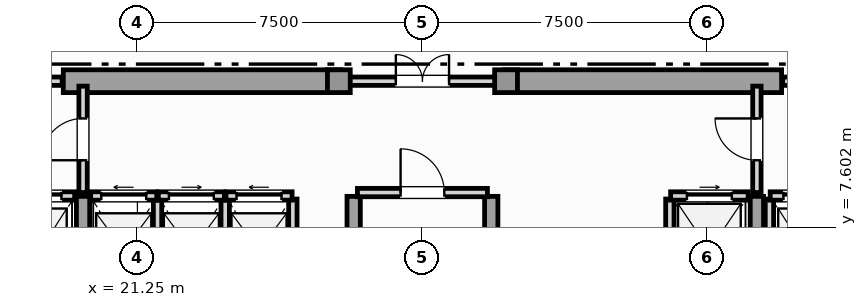
"""IFC4 building model, lengths in metres.
Left out: names, types, materials, properties, quantities, classifications, styles, units other than length and angle.
Written with IfcOpenShell. Run it as: python <this file> out.ifc"""

import sys

from ifc_helpers import new_model, si_unit, direction, frame, frame_2d, origin, origin_2d, place, context, subcontext, project, spatial, rectangle, extrude, element, fill, save


model = new_model("IFC4")
c1 = context("Model", 3, precision=1e-05, world=origin(), true_north=direction((0.0, 1.0)))
c2 = subcontext(c1, "Body", "Model", "MODEL_VIEW")
j1 = project(units=[si_unit("LENGTHUNIT", "METRE"), si_unit("PLANEANGLEUNIT", "RADIAN")], contexts=[c1])
p1 = place(None, origin())
s1 = spatial("IfcSite", under=j1, at=p1, CompositionType="ELEMENT")
p2 = place(p1, origin())
s2 = spatial("IfcBuilding", under=s1, at=p2, CompositionType="ELEMENT")
p3 = place(p2, frame((0.0, 0.0, 292.6)))
s3 = spatial("IfcBuildingStorey", under=s2, at=p3, CompositionType="ELEMENT", Elevation=292.6)
for number, where, z_axis, x_axis in (
    (1, (19.3, 11.45, 0.0), (0.0, 0.0, 1.0), (1.0, 0.0, 0.0)),
    (2, (30.9, 11.45, 0.0), (0.0, 0.0, 1.0), (1.0, 0.0, 0.0)),
):
    element("IfcWall", number, at=place(p3, frame(where, z_axis=z_axis, x_axis=x_axis)), inside=s3, PredefinedType="SHEAR", context=c2, shape_type="SweptSolid", body=[
        extrude(rectangle(XDim=7.3, YDim=0.6, at=frame_2d((3.65, 0.0))), origin(), (0.0, 0.0, 1.0), 3.65),
    ])
for number, where, z_axis, x_axis in (
    (3, (19.82, 0.92, 0.0), (0.0, 0.0, 1.0), (0.0, 1.0, 0.0)),
    (4, (26.94, 0.92, 0.0), (0.0, 0.0, 1.0), (0.0, 1.0, 0.0)),
    (5, (30.56, 0.92, 0.0), (0.0, 0.0, 1.0), (0.0, 1.0, 0.0)),
    (6, (37.55, 0.92, 0.0), (0.0, 0.0, 1.0), (0.0, 1.0, 0.0)),
):
    element("IfcWall", number, at=place(p3, frame(where, z_axis=z_axis, x_axis=x_axis)), inside=s3, PredefinedType="SHEAR", context=c2, shape_type="SweptSolid", body=[
        extrude(rectangle(XDim=7.5, YDim=0.35, at=frame_2d((3.75, 0.0))), origin(), (0.0, 0.0, 1.0), 3.65),
    ])
for number, where, z_axis, x_axis in (
    (7, (26.55, 11.45, 0.0), (0.0, 0.0, 1.0), (1.0, 0.0, 0.0)),
    (8, (30.95, 11.45, 0.0), (0.0, 0.0, 1.0), (1.0, 0.0, 0.0)),
):
    element("IfcColumn", number, at=place(p3, frame(where, z_axis=z_axis, x_axis=x_axis)), inside=s3, PredefinedType="COLUMN", context=c2, shape_type="SweptSolid", body=[
        extrude(rectangle(XDim=0.6, YDim=0.6, at=origin_2d()), origin(), (0.0, 0.0, 1.0), 3.85),
    ])
p4 = place(p3, frame((17.78, 8.43, 0.0), z_axis=(0.0, 0.0, 1.0), x_axis=(1.0, 0.0, 0.0)))
e9 = element("IfcWall", 9, at=p4, inside=s3, PredefinedType="SOLIDWALL", context=c2, shape_type="SweptSolid", body=[
    extrude(rectangle(XDim=1.82, YDim=0.22, at=frame_2d((0.91, 0.0))), origin(), (0.0, 0.0, 1.0), 3.65),
])
p5 = place(p4, frame((0.35, 0.0, 0.0)))
e10 = element("IfcOpeningElement", 10, at=p5, cuts=e9, PredefinedType="OPENING", context=c2, shape_type="SweptSolid", body=[
    extrude(rectangle(XDim=1.12, YDim=2.25, at=frame_2d((0.56, 1.125))), frame((0.0, 0.12, 0.0), z_axis=(0.0, -1.0, 0.0), x_axis=(1.0, 0.0, 0.0)), (0.0, 0.0, 1.0), 0.24),
])
p6 = place(p3, frame((37.88, 5.65, 0.0), z_axis=(0.0, 0.0, 1.0), x_axis=(0.0, 1.0, 0.0)))
e11 = element("IfcWall", 11, at=p6, inside=s3, PredefinedType="SOLIDWALL", context=c2, shape_type="SweptSolid", body=[
    extrude(rectangle(XDim=2.7, YDim=0.22, at=frame_2d((1.35, 0.0))), origin(), (0.0, 0.0, 1.0), 3.65),
])
p7 = place(p3, frame((37.9, 8.43, 0.0), z_axis=(0.0, 0.0, 1.0), x_axis=(1.0, 0.0, 0.0)))
e12 = element("IfcWall", 12, at=p7, inside=s3, PredefinedType="SOLIDWALL", context=c2, shape_type="SweptSolid", body=[
    extrude(rectangle(XDim=1.82, YDim=0.22, at=frame_2d((0.91, 0.0))), origin(), (0.0, 0.0, 1.0), 3.65),
])
p8 = place(p7, frame((0.35, 0.0, 0.0)))
e13 = element("IfcOpeningElement", 13, at=p8, cuts=e12, PredefinedType="OPENING", context=c2, shape_type="SweptSolid", body=[
    extrude(rectangle(XDim=1.12, YDim=2.25, at=frame_2d((0.56, 1.125))), frame((0.0, 0.12, 0.0), z_axis=(0.0, -1.0, 0.0), x_axis=(1.0, 0.0, 0.0)), (0.0, 0.0, 1.0), 0.24),
])
p9 = place(p3, frame((35.26, 5.65, 0.0), z_axis=(0.0, 0.0, 1.0), x_axis=(0.0, 1.0, 0.0)))
e14 = element("IfcWall", 14, at=p9, inside=s3, PredefinedType="SOLIDWALL", context=c2, shape_type="SweptSolid", body=[
    extrude(rectangle(XDim=2.7, YDim=0.22, at=frame_2d((1.35, 0.0))), origin(), (0.0, 0.0, 1.0), 3.65),
])
p10 = place(p3, frame((35.28, 8.43, 0.0), z_axis=(0.0, 0.0, 1.0), x_axis=(1.0, 0.0, 0.0)))
e15 = element("IfcWall", 15, at=p10, inside=s3, PredefinedType="SOLIDWALL", context=c2, shape_type="SweptSolid", body=[
    extrude(rectangle(XDim=2.04, YDim=0.22, at=frame_2d((1.02, 0.0))), origin(), (0.0, 0.0, 1.0), 3.65),
])
p11 = place(p10, frame((0.43, 0.0, 0.0)))
e16 = element("IfcOpeningElement", 16, at=p11, cuts=e15, PredefinedType="OPENING", context=c2, shape_type="SweptSolid", body=[
    extrude(rectangle(XDim=1.18, YDim=2.2, at=frame_2d((0.59, 1.1))), frame((0.0, 0.12, 0.0), z_axis=(0.0, -1.0, 0.0), x_axis=(1.0, 0.0, 0.0)), (0.0, 0.0, 1.0), 0.24),
])
p12 = place(p3, frame((21.78, 5.65, 0.0), z_axis=(0.0, 0.0, 1.0), x_axis=(0.0, 1.0, 0.0)))
e17 = element("IfcWall", 17, at=p12, inside=s3, PredefinedType="SOLIDWALL", context=c2, shape_type="SweptSolid", body=[
    extrude(rectangle(XDim=2.7, YDim=0.22, at=frame_2d((1.35, 0.0))), origin(), (0.0, 0.0, 1.0), 3.65),
])
p13 = place(p3, frame((20.02, 8.43, 0.0), z_axis=(0.0, 0.0, 1.0), x_axis=(1.0, 0.0, 0.0)))
e18 = element("IfcWall", 18, at=p13, inside=s3, PredefinedType="SOLIDWALL", context=c2, shape_type="SweptSolid", body=[
    extrude(rectangle(XDim=1.74, YDim=0.22, at=frame_2d((0.87, 0.0))), origin(), (0.0, 0.0, 1.0), 3.65),
])
p14 = place(p13, frame((0.28, 0.0, 0.0)))
e19 = element("IfcOpeningElement", 19, at=p14, cuts=e18, PredefinedType="OPENING", context=c2, shape_type="SweptSolid", body=[
    extrude(rectangle(XDim=1.18, YDim=2.2, at=frame_2d((0.59, 1.1))), frame((0.0, 0.12, 0.0), z_axis=(0.0, -1.0, 0.0), x_axis=(1.0, 0.0, 0.0)), (0.0, 0.0, 1.0), 0.24),
])
p15 = place(p3, frame((23.56, 5.65, 0.0), z_axis=(0.0, 0.0, 1.0), x_axis=(0.0, 1.0, 0.0)))
e20 = element("IfcWall", 20, at=p15, inside=s3, PredefinedType="SOLIDWALL", context=c2, shape_type="SweptSolid", body=[
    extrude(rectangle(XDim=2.7, YDim=0.22, at=frame_2d((1.35, 0.0))), origin(), (0.0, 0.0, 1.0), 3.65),
])
p16 = place(p3, frame((21.8, 8.43, 0.0), z_axis=(0.0, 0.0, 1.0), x_axis=(1.0, 0.0, 0.0)))
e21 = element("IfcWall", 21, at=p16, inside=s3, PredefinedType="SOLIDWALL", context=c2, shape_type="SweptSolid", body=[
    extrude(rectangle(XDim=1.74, YDim=0.22, at=frame_2d((0.87, 0.0))), origin(), (0.0, 0.0, 1.0), 3.65),
])
p17 = place(p16, frame((0.28, 0.0, 0.0)))
e22 = element("IfcOpeningElement", 22, at=p17, cuts=e21, PredefinedType="OPENING", context=c2, shape_type="SweptSolid", body=[
    extrude(rectangle(XDim=1.18, YDim=2.2, at=frame_2d((0.59, 1.1))), frame((0.0, 0.12, 0.0), z_axis=(0.0, -1.0, 0.0), x_axis=(1.0, 0.0, 0.0)), (0.0, 0.0, 1.0), 0.24),
])
p18 = place(p3, frame((25.34, 5.65, 0.0), z_axis=(0.0, 0.0, 1.0), x_axis=(0.0, 1.0, 0.0)))
e23 = element("IfcWall", 23, at=p18, inside=s3, PredefinedType="SOLIDWALL", context=c2, shape_type="SweptSolid", body=[
    extrude(rectangle(XDim=2.7, YDim=0.22, at=frame_2d((1.35, 0.0))), origin(), (0.0, 0.0, 1.0), 3.65),
])
p19 = place(p3, frame((23.58, 8.43, 0.0), z_axis=(0.0, 0.0, 1.0), x_axis=(1.0, 0.0, 0.0)))
e24 = element("IfcWall", 24, at=p19, inside=s3, PredefinedType="SOLIDWALL", context=c2, shape_type="SweptSolid", body=[
    extrude(rectangle(XDim=1.74, YDim=0.22, at=frame_2d((0.87, 0.0))), origin(), (0.0, 0.0, 1.0), 3.65),
])
p20 = place(p19, frame((0.28, 0.0, 0.0)))
e25 = element("IfcOpeningElement", 25, at=p20, cuts=e24, PredefinedType="OPENING", context=c2, shape_type="SweptSolid", body=[
    extrude(rectangle(XDim=1.18, YDim=2.2, at=frame_2d((0.59, 1.1))), frame((0.0, 0.12, 0.0), z_axis=(0.0, -1.0, 0.0), x_axis=(1.0, 0.0, 0.0)), (0.0, 0.0, 1.0), 0.24),
])
p21 = place(p3, frame((27.04, 8.52, 0.0), z_axis=(0.0, 0.0, 1.0), x_axis=(1.0, 0.0, 0.0)))
e26 = element("IfcWall", 26, at=p21, inside=s3, PredefinedType="SOLIDWALL", context=c2, shape_type="SweptSolid", body=[
    extrude(rectangle(XDim=3.42, YDim=0.22, at=frame_2d((1.71, 0.0))), origin(), (0.0, 0.0, 1.0), 3.65),
])
p22 = place(p21, frame((1.135, 0.0, 0.0)))
e27 = element("IfcOpeningElement", 27, at=p22, cuts=e26, PredefinedType="OPENING", context=c2, shape_type="SweptSolid", body=[
    extrude(rectangle(XDim=1.15, YDim=2.2, at=frame_2d((0.575, 1.1))), frame((0.0, 0.12, 0.0), z_axis=(0.0, -1.0, 0.0), x_axis=(1.0, 0.0, 0.0)), (0.0, 0.0, 1.0), 0.24),
])
p23 = place(p3, frame((19.82, 8.52, 0.0), z_axis=(0.0, 0.0, 1.0), x_axis=(0.0, 1.0, 0.0)))
e28 = element("IfcWall", 28, at=p23, inside=s3, PredefinedType="SOLIDWALL", context=c2, shape_type="SweptSolid", body=[
    extrude(rectangle(XDim=2.8, YDim=0.22, at=frame_2d((1.4, 0.0))), origin(), (0.0, 0.0, 1.0), 3.105),
])
p24 = place(p23, frame((0.85, 0.0, 0.0)))
e29 = element("IfcOpeningElement", 29, at=p24, cuts=e28, PredefinedType="OPENING", context=c2, shape_type="SweptSolid", body=[
    extrude(rectangle(XDim=1.1, YDim=2.2, at=frame_2d((0.55, 1.1))), frame((0.0, 0.12, 0.0), z_axis=(0.0, -1.0, 0.0), x_axis=(1.0, 0.0, 0.0)), (0.0, 0.0, 1.0), 0.24),
])
p25 = place(p3, frame((37.55, 8.52, 0.0), z_axis=(0.0, 0.0, 1.0), x_axis=(0.0, 1.0, 0.0)))
e30 = element("IfcWall", 30, at=p25, inside=s3, PredefinedType="SOLIDWALL", context=c2, shape_type="SweptSolid", body=[
    extrude(rectangle(XDim=2.8, YDim=0.22, at=frame_2d((1.4, 0.0))), origin(), (0.0, 0.0, 1.0), 3.105),
])
p26 = place(p25, frame((0.85, 0.0, 0.0)))
e31 = element("IfcOpeningElement", 31, at=p26, cuts=e30, PredefinedType="OPENING", context=c2, shape_type="SweptSolid", body=[
    extrude(rectangle(XDim=1.1, YDim=2.2, at=frame_2d((0.55, 1.1))), frame((0.0, 0.12, 0.0), z_axis=(0.0, -1.0, 0.0), x_axis=(1.0, 0.0, 0.0)), (0.0, 0.0, 1.0), 0.24),
])
p27 = place(p3, frame((16.23, 11.45, 0.0), z_axis=(0.0, 0.0, 1.0), x_axis=(1.0, 0.0, 0.0)))
e32 = element("IfcWall", 32, at=p27, inside=s3, PredefinedType="SOLIDWALL", context=c2, shape_type="SweptSolid", body=[
    extrude(rectangle(XDim=3.04, YDim=0.22, at=frame_2d((1.52, 0.0))), origin(), (0.0, 0.0, 1.0), 3.65),
])
p28 = place(p27, frame((0.97, 0.0, 0.0)))
e33 = element("IfcOpeningElement", 33, at=p28, cuts=e32, PredefinedType="OPENING", context=c2, shape_type="SweptSolid", body=[
    extrude(rectangle(XDim=1.1, YDim=2.2, at=frame_2d((0.55, 1.1))), frame((0.0, 0.12, 0.0), z_axis=(0.0, -1.0, 0.0), x_axis=(1.0, 0.0, 0.0)), (0.0, 0.0, 1.0), 0.24),
])
p29 = place(p3, frame((26.63, 11.45, 0.0), z_axis=(0.0, 0.0, 1.0), x_axis=(1.0, 0.0, 0.0)))
e34 = element("IfcWall", 34, at=p29, inside=s3, PredefinedType="SOLIDWALL", context=c2, shape_type="SweptSolid", body=[
    extrude(rectangle(XDim=4.24, YDim=0.22, at=frame_2d((2.12, 0.0))), origin(), (0.0, 0.0, 1.0), 3.65),
])
p30 = place(p29, frame((1.42, 0.0, 0.0)))
e35 = element("IfcOpeningElement", 35, at=p30, cuts=e34, PredefinedType="OPENING", context=c2, shape_type="SweptSolid", body=[
    extrude(rectangle(XDim=1.4, YDim=2.2, at=frame_2d((0.7, 1.1))), frame((0.0, 0.12, 0.0), z_axis=(0.0, -1.0, 0.0), x_axis=(1.0, 0.0, 0.0)), (0.0, 0.0, 1.0), 0.24),
])
p31 = place(p3, frame((38.23, 11.45, 0.0), z_axis=(0.0, 0.0, 1.0), x_axis=(1.0, 0.0, 0.0)))
e36 = element("IfcWall", 36, at=p31, inside=s3, PredefinedType="SOLIDWALL", context=c2, shape_type="SweptSolid", body=[
    extrude(rectangle(XDim=3.04, YDim=0.22, at=frame_2d((1.52, 0.0))), origin(), (0.0, 0.0, 1.0), 3.65),
])
p32 = place(p31, frame((0.97, 0.0, 0.0)))
e37 = element("IfcOpeningElement", 37, at=p32, cuts=e36, PredefinedType="OPENING", context=c2, shape_type="SweptSolid", body=[
    extrude(rectangle(XDim=1.1, YDim=2.2, at=frame_2d((0.55, 1.1))), frame((0.0, 0.12, 0.0), z_axis=(0.0, -1.0, 0.0), x_axis=(1.0, 0.0, 0.0)), (0.0, 0.0, 1.0), 0.24),
])
p33 = place(p5, origin())
e38 = element("IfcDoor", 38, at=p33, inside=s3, OperationType="SLIDING_TO_RIGHT", PredefinedType="DOOR", context=c2, shape_type="SweptSolid", body=[
    extrude(rectangle(XDim=1.12, YDim=2.25, at=frame_2d((0.56, 1.125))), frame((0.0, 0.025, 0.0), z_axis=(0.0, -1.0, 0.0), x_axis=(1.0, 0.0, 0.0)), (0.0, 0.0, 1.0), 0.05),
])
fill(e10, e38)
p34 = place(p8, origin())
e39 = element("IfcDoor", 39, at=p34, inside=s3, OperationType="SLIDING_TO_LEFT", PredefinedType="DOOR", context=c2, shape_type="SweptSolid", body=[
    extrude(rectangle(XDim=1.12, YDim=2.25, at=frame_2d((0.56, 1.125))), frame((0.0, 0.025, 0.0), z_axis=(0.0, -1.0, 0.0), x_axis=(1.0, 0.0, 0.0)), (0.0, 0.0, 1.0), 0.05),
])
fill(e13, e39)
p35 = place(p11, origin())
e40 = element("IfcDoor", 40, at=p35, inside=s3, OperationType="SLIDING_TO_RIGHT", PredefinedType="DOOR", context=c2, shape_type="SweptSolid", body=[
    extrude(rectangle(XDim=1.18, YDim=2.2, at=frame_2d((0.59, 1.1))), frame((0.0, 0.025, 0.0), z_axis=(0.0, -1.0, 0.0), x_axis=(1.0, 0.0, 0.0)), (0.0, 0.0, 1.0), 0.05),
])
fill(e16, e40)
p36 = place(p14, origin())
e41 = element("IfcDoor", 41, at=p36, inside=s3, OperationType="SLIDING_TO_LEFT", PredefinedType="DOOR", context=c2, shape_type="SweptSolid", body=[
    extrude(rectangle(XDim=1.18, YDim=2.2, at=frame_2d((0.59, 1.1))), frame((0.0, 0.025, 0.0), z_axis=(0.0, -1.0, 0.0), x_axis=(1.0, 0.0, 0.0)), (0.0, 0.0, 1.0), 0.05),
])
fill(e19, e41)
p37 = place(p17, origin())
e42 = element("IfcDoor", 42, at=p37, inside=s3, OperationType="SLIDING_TO_RIGHT", PredefinedType="DOOR", context=c2, shape_type="SweptSolid", body=[
    extrude(rectangle(XDim=1.18, YDim=2.2, at=frame_2d((0.59, 1.1))), frame((0.0, 0.025, 0.0), z_axis=(0.0, -1.0, 0.0), x_axis=(1.0, 0.0, 0.0)), (0.0, 0.0, 1.0), 0.05),
])
fill(e22, e42)
p38 = place(p20, origin())
e43 = element("IfcDoor", 43, at=p38, inside=s3, OperationType="SLIDING_TO_LEFT", PredefinedType="DOOR", context=c2, shape_type="SweptSolid", body=[
    extrude(rectangle(XDim=1.18, YDim=2.2, at=frame_2d((0.59, 1.1))), frame((0.0, 0.025, 0.0), z_axis=(0.0, -1.0, 0.0), x_axis=(1.0, 0.0, 0.0)), (0.0, 0.0, 1.0), 0.05),
])
fill(e25, e43)
p39 = place(p22, origin())
e44 = element("IfcDoor", 44, at=p39, inside=s3, OperationType="SINGLE_SWING_LEFT", PredefinedType="DOOR", context=c2, shape_type="SweptSolid", body=[
    extrude(rectangle(XDim=1.15, YDim=2.2, at=frame_2d((0.575, 1.1))), frame((0.0, 0.025, 0.0), z_axis=(0.0, -1.0, 0.0), x_axis=(1.0, 0.0, 0.0)), (0.0, 0.0, 1.0), 0.05),
])
fill(e27, e44)
p40 = place(p24, origin())
e45 = element("IfcDoor", 45, at=p40, inside=s3, OperationType="SINGLE_SWING_LEFT", PredefinedType="DOOR", context=c2, shape_type="SweptSolid", body=[
    extrude(rectangle(XDim=1.1, YDim=2.2, at=frame_2d((0.55, 1.1))), frame((0.0, 0.025, 0.0), z_axis=(0.0, -1.0, 0.0), x_axis=(1.0, 0.0, 0.0)), (0.0, 0.0, 1.0), 0.05),
])
fill(e29, e45)
p41 = place(p26, origin())
e46 = element("IfcDoor", 46, at=p41, inside=s3, OperationType="SINGLE_SWING_RIGHT", PredefinedType="DOOR", context=c2, shape_type="SweptSolid", body=[
    extrude(rectangle(XDim=1.1, YDim=2.2, at=frame_2d((0.55, 1.1))), frame((0.0, 0.025, 0.0), z_axis=(0.0, -1.0, 0.0), x_axis=(1.0, 0.0, 0.0)), (0.0, 0.0, 1.0), 0.05),
])
fill(e31, e46)
p42 = place(p30, origin())
e47 = element("IfcDoor", 47, at=p42, inside=s3, OperationType="DOUBLE_DOOR_SINGLE_SWING", PredefinedType="DOOR", context=c2, shape_type="SweptSolid", body=[
    extrude(rectangle(XDim=1.4, YDim=2.2, at=frame_2d((0.7, 1.1))), frame((0.0, 0.025, 0.0), z_axis=(0.0, -1.0, 0.0), x_axis=(1.0, 0.0, 0.0)), (0.0, 0.0, 1.0), 0.05),
])
fill(e35, e47)
save(model, sys.argv[1])
